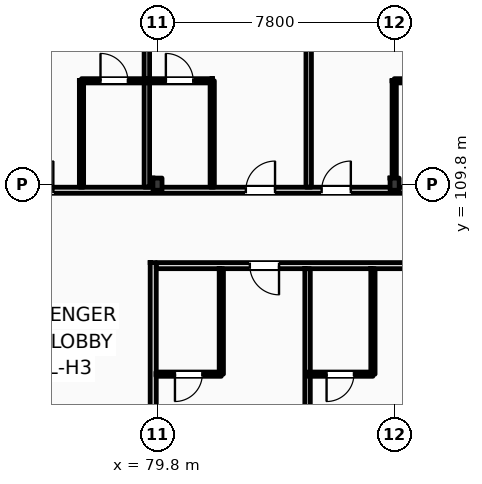
"""IFC4 building model, lengths in metres.
Left out: names, types, materials, properties, quantities, classifications, styles, units other than length and angle.
Written with IfcOpenShell. Run it as: python <this file> out.ifc"""

import sys

from ifc_helpers import new_model, si_unit, direction, frame, frame_2d, origin, origin_2d, place, context, subcontext, project, spatial, rectangle, i_section, extrude, element, fill, save


model = new_model("IFC4")
c1 = context("Model", 3, precision=1e-05, world=origin(), true_north=direction((0.0, 1.0)))
c2 = subcontext(c1, "Body", "Model", "MODEL_VIEW")
j1 = project(units=[si_unit("LENGTHUNIT", "METRE"), si_unit("PLANEANGLEUNIT", "RADIAN")], contexts=[c1])
p1 = place(None, origin())
s1 = spatial("IfcSite", under=j1, at=p1, CompositionType="ELEMENT")
p2 = place(p1, origin())
s2 = spatial("IfcBuilding", under=s1, at=p2, CompositionType="ELEMENT")
p3 = place(p2, frame((0.0, 0.0, 42.6)))
s3 = spatial("IfcBuildingStorey", under=s2, at=p3, CompositionType="ELEMENT", Elevation=42.6)
for number, where, z_axis, x_axis in (
    (1, (79.8, 109.8, 0.0), (0.0, 0.0, 1.0), (1.0, 0.0, 0.0)),
    (2, (87.6, 109.8, 0.0), (0.0, 0.0, 1.0), (1.0, 0.0, 0.0)),
):
    element("IfcColumn", number, at=place(p3, frame(where, z_axis=z_axis, x_axis=x_axis)), inside=s3, PredefinedType="COLUMN", context=c2, shape_type="SweptSolid", body=[
        extrude(i_section(OverallWidth=0.3, OverallDepth=0.4, WebThickness=0.013, FlangeThickness=0.024, FilletRadius=0.027, at=origin_2d()), origin(), (0.0, 0.0, 1.0), 4.2),
    ])
p4 = place(p3, frame((10.65, 109.6, 0.0), z_axis=(0.0, 0.0, 1.0), x_axis=(1.0, 0.0, 0.0)))
e3 = element("IfcWall", 3, at=p4, inside=s3, PredefinedType="PARTITIONING", context=c2, shape_type="SweptSolid", body=[
    extrude(rectangle(XDim=84.61, YDim=0.2, at=frame_2d((42.305, 0.0))), origin(), (0.0, 0.0, 1.0), 3.38),
])
p5 = place(p4, frame((15.926, 0.0, 0.0)))
e4 = element("IfcOpeningElement", 4, at=p5, cuts=e3, PredefinedType="OPENING", context=c2, shape_type="SweptSolid", body=[
    extrude(rectangle(XDim=1.02, YDim=2.2, at=frame_2d((0.51, 1.1))), frame((0.0, 0.11, 0.0), z_axis=(0.0, -1.0, 0.0), x_axis=(1.0, 0.0, 0.0)), (0.0, 0.0, 1.0), 0.22),
])
p6 = place(p4, frame((18.45, 0.0, 0.0)))
e5 = element("IfcOpeningElement", 5, at=p6, cuts=e3, PredefinedType="OPENING", context=c2, shape_type="SweptSolid", body=[
    extrude(rectangle(XDim=1.02, YDim=2.2, at=frame_2d((0.51, 1.1))), frame((0.0, 0.11, 0.0), z_axis=(0.0, -1.0, 0.0), x_axis=(1.0, 0.0, 0.0)), (0.0, 0.0, 1.0), 0.22),
])
p7 = place(p4, frame((25.742, 0.0, 0.0)))
e6 = element("IfcOpeningElement", 6, at=p7, cuts=e3, PredefinedType="OPENING", context=c2, shape_type="SweptSolid", body=[
    extrude(rectangle(XDim=1.02, YDim=2.2, at=frame_2d((0.51, 1.1))), frame((0.0, 0.11, 0.0), z_axis=(0.0, -1.0, 0.0), x_axis=(1.0, 0.0, 0.0)), (0.0, 0.0, 1.0), 0.22),
])
p8 = place(p4, frame((31.385, 0.0, 0.0)))
e7 = element("IfcOpeningElement", 7, at=p8, cuts=e3, PredefinedType="OPENING", context=c2, shape_type="SweptSolid", body=[
    extrude(rectangle(XDim=1.02, YDim=2.2, at=frame_2d((0.51, 1.1))), frame((0.0, 0.11, 0.0), z_axis=(0.0, -1.0, 0.0), x_axis=(1.0, 0.0, 0.0)), (0.0, 0.0, 1.0), 0.22),
])
p9 = place(p4, frame((33.908, 0.0, 0.0)))
e8 = element("IfcOpeningElement", 8, at=p9, cuts=e3, PredefinedType="OPENING", context=c2, shape_type="SweptSolid", body=[
    extrude(rectangle(XDim=0.96, YDim=2.2, at=frame_2d((0.48, 1.1))), frame((0.0, 0.11, 0.0), z_axis=(0.0, -1.0, 0.0), x_axis=(1.0, 0.0, 0.0)), (0.0, 0.0, 1.0), 0.22),
])
p10 = place(p4, frame((41.201, 0.0, 0.0)))
e9 = element("IfcOpeningElement", 9, at=p10, cuts=e3, PredefinedType="OPENING", context=c2, shape_type="SweptSolid", body=[
    extrude(rectangle(XDim=0.96, YDim=2.2, at=frame_2d((0.48, 1.1))), frame((0.0, 0.11, 0.0), z_axis=(0.0, -1.0, 0.0), x_axis=(1.0, 0.0, 0.0)), (0.0, 0.0, 1.0), 0.22),
])
p11 = place(p4, frame((46.844, 0.0, 0.0)))
e10 = element("IfcOpeningElement", 10, at=p11, cuts=e3, PredefinedType="OPENING", context=c2, shape_type="SweptSolid", body=[
    extrude(rectangle(XDim=0.96, YDim=2.2, at=frame_2d((0.48, 1.1))), frame((0.0, 0.11, 0.0), z_axis=(0.0, -1.0, 0.0), x_axis=(1.0, 0.0, 0.0)), (0.0, 0.0, 1.0), 0.22),
])
p12 = place(p4, frame((49.337, 0.0, 0.0)))
e11 = element("IfcOpeningElement", 11, at=p12, cuts=e3, PredefinedType="OPENING", context=c2, shape_type="SweptSolid", body=[
    extrude(rectangle(XDim=0.96, YDim=2.2, at=frame_2d((0.48, 1.1))), frame((0.0, 0.11, 0.0), z_axis=(0.0, -1.0, 0.0), x_axis=(1.0, 0.0, 0.0)), (0.0, 0.0, 1.0), 0.22),
])
p13 = place(p4, frame((56.63, 0.0, 0.0)))
e12 = element("IfcOpeningElement", 12, at=p13, cuts=e3, PredefinedType="OPENING", context=c2, shape_type="SweptSolid", body=[
    extrude(rectangle(XDim=0.96, YDim=2.2, at=frame_2d((0.48, 1.1))), frame((0.0, 0.11, 0.0), z_axis=(0.0, -1.0, 0.0), x_axis=(1.0, 0.0, 0.0)), (0.0, 0.0, 1.0), 0.22),
])
p14 = place(p4, frame((62.523, 0.0, 0.0)))
e13 = element("IfcOpeningElement", 13, at=p14, cuts=e3, PredefinedType="OPENING", context=c2, shape_type="SweptSolid", body=[
    extrude(rectangle(XDim=0.96, YDim=2.2, at=frame_2d((0.48, 1.1))), frame((0.0, 0.11, 0.0), z_axis=(0.0, -1.0, 0.0), x_axis=(1.0, 0.0, 0.0)), (0.0, 0.0, 1.0), 0.22),
])
p15 = place(p4, frame((64.765, 0.0, 0.0)))
e14 = element("IfcOpeningElement", 14, at=p15, cuts=e3, PredefinedType="OPENING", context=c2, shape_type="SweptSolid", body=[
    extrude(rectangle(XDim=0.96, YDim=2.2, at=frame_2d((0.48, 1.1))), frame((0.0, 0.11, 0.0), z_axis=(0.0, -1.0, 0.0), x_axis=(1.0, 0.0, 0.0)), (0.0, 0.0, 1.0), 0.22),
])
p16 = place(p4, frame((72.057, 0.0, 0.0)))
e15 = element("IfcOpeningElement", 15, at=p16, cuts=e3, PredefinedType="OPENING", context=c2, shape_type="SweptSolid", body=[
    extrude(rectangle(XDim=0.96, YDim=2.2, at=frame_2d((0.48, 1.1))), frame((0.0, 0.11, 0.0), z_axis=(0.0, -1.0, 0.0), x_axis=(1.0, 0.0, 0.0)), (0.0, 0.0, 1.0), 0.22),
])
p17 = place(p4, frame((74.55, 0.0, 0.0)))
e16 = element("IfcOpeningElement", 16, at=p17, cuts=e3, PredefinedType="OPENING", context=c2, shape_type="SweptSolid", body=[
    extrude(rectangle(XDim=0.96, YDim=2.2, at=frame_2d((0.48, 1.1))), frame((0.0, 0.11, 0.0), z_axis=(0.0, -1.0, 0.0), x_axis=(1.0, 0.0, 0.0)), (0.0, 0.0, 1.0), 0.22),
])
p18 = place(p4, frame((80.163, 0.0, 0.0)))
e17 = element("IfcOpeningElement", 17, at=p18, cuts=e3, PredefinedType="OPENING", context=c2, shape_type="SweptSolid", body=[
    extrude(rectangle(XDim=0.96, YDim=2.2, at=frame_2d((0.48, 1.1))), frame((0.0, 0.11, 0.0), z_axis=(0.0, -1.0, 0.0), x_axis=(1.0, 0.0, 0.0)), (0.0, 0.0, 1.0), 0.22),
])
p19 = place(p4, frame((2.716, 0.0, 0.0)))
e18 = element("IfcOpeningElement", 18, at=p19, cuts=e3, PredefinedType="OPENING", context=c2, shape_type="SweptSolid", body=[
    extrude(rectangle(XDim=1.35, YDim=2.25, at=frame_2d((0.675, 1.125))), frame((0.0, 0.11, 0.0), z_axis=(0.0, -1.0, 0.0), x_axis=(1.0, 0.0, 0.0)), (0.0, 0.0, 1.0), 0.22),
])
p20 = place(p4, frame((6.65, 0.0, 0.0)))
e19 = element("IfcOpeningElement", 19, at=p20, cuts=e3, PredefinedType="OPENING", context=c2, shape_type="SweptSolid", body=[
    extrude(rectangle(XDim=1.35, YDim=2.25, at=frame_2d((0.675, 1.125))), frame((0.0, 0.11, 0.0), z_axis=(0.0, -1.0, 0.0), x_axis=(1.0, 0.0, 0.0)), (0.0, 0.0, 1.0), 0.22),
])
p21 = place(p4, frame((10.583, 0.0, 0.0)))
e20 = element("IfcOpeningElement", 20, at=p21, cuts=e3, PredefinedType="OPENING", context=c2, shape_type="SweptSolid", body=[
    extrude(rectangle(XDim=1.35, YDim=2.25, at=frame_2d((0.675, 1.125))), frame((0.0, 0.11, 0.0), z_axis=(0.0, -1.0, 0.0), x_axis=(1.0, 0.0, 0.0)), (0.0, 0.0, 1.0), 0.22),
])
p22 = place(p3, frame((79.76, 107.12, 0.0), z_axis=(0.0, 0.0, 1.0), x_axis=(1.0, 0.0, 0.0)))
e21 = element("IfcWall", 21, at=p22, inside=s3, PredefinedType="PARTITIONING", context=c2, shape_type="SweptSolid", body=[
    extrude(rectangle(XDim=15.5, YDim=0.2, at=frame_2d((7.75, 0.0))), origin(), (0.0, 0.0, 1.0), 3.94),
])
p23 = place(p22, frame((3.078, 0.0, 0.0)))
e22 = element("IfcOpeningElement", 22, at=p23, cuts=e21, PredefinedType="OPENING", context=c2, shape_type="SweptSolid", body=[
    extrude(rectangle(XDim=0.96, YDim=2.2, at=frame_2d((0.48, 1.1))), frame((0.0, 0.11, 0.0), z_axis=(0.0, -1.0, 0.0), x_axis=(1.0, 0.0, 0.0)), (0.0, 0.0, 1.0), 0.22),
])
p24 = place(p22, frame((8.186, 0.0, 0.0)))
e23 = element("IfcOpeningElement", 23, at=p24, cuts=e21, PredefinedType="OPENING", context=c2, shape_type="SweptSolid", body=[
    extrude(rectangle(XDim=0.96, YDim=2.2, at=frame_2d((0.48, 1.1))), frame((0.0, 0.11, 0.0), z_axis=(0.0, -1.0, 0.0), x_axis=(1.0, 0.0, 0.0)), (0.0, 0.0, 1.0), 0.22),
])
p25 = place(p22, frame((11.167, 0.0, 0.0)))
e24 = element("IfcOpeningElement", 24, at=p25, cuts=e21, PredefinedType="OPENING", context=c2, shape_type="SweptSolid", body=[
    extrude(rectangle(XDim=0.96, YDim=2.2, at=frame_2d((0.48, 1.1))), frame((0.0, 0.11, 0.0), z_axis=(0.0, -1.0, 0.0), x_axis=(1.0, 0.0, 0.0)), (0.0, 0.0, 1.0), 0.22),
])
p26 = place(p3, frame((79.66, 96.14, 0.0), z_axis=(0.0, 0.0, 1.0), x_axis=(0.0, 1.0, 0.0)))
e25 = element("IfcWall", 25, at=p26, inside=s3, PredefinedType="PARTITIONING", context=c2, shape_type="SweptSolid", body=[
    extrude(rectangle(XDim=11.08, YDim=0.2, at=frame_2d((5.54, 0.0))), origin(), (0.0, 0.0, 1.0), 3.51),
])
p27 = place(p3, frame((79.451, 109.7, 0.0), z_axis=(0.0, 0.0, 1.0), x_axis=(0.0, 1.0, 0.0)))
e26 = element("IfcWall", 26, at=p27, inside=s3, PredefinedType="PARTITIONING", context=c2, shape_type="SweptSolid", body=[
    extrude(rectangle(XDim=8.15, YDim=0.18, at=frame_2d((4.075, 0.0))), origin(), (0.0, 0.0, 1.0), 3.94),
])
p28 = place(p3, frame((77.301, 109.7, 0.0), z_axis=(0.0, 0.0, 1.0), x_axis=(0.0, 1.0, 0.0)))
e27 = element("IfcWall", 27, at=p28, inside=s3, PredefinedType="PARTITIONING", context=c2, shape_type="SweptSolid", body=[
    extrude(rectangle(XDim=3.5, YDim=0.14, at=frame_2d((1.75, 0.0))), origin(), (0.0, 0.0, 1.0), 3.63),
])
p29 = place(p3, frame((77.301, 113.2, 0.0), z_axis=(0.0, 0.0, 1.0), x_axis=(1.0, 0.0, 0.0)))
e28 = element("IfcWall", 28, at=p29, inside=s3, PredefinedType="PARTITIONING", context=c2, shape_type="SweptSolid", body=[
    extrude(rectangle(XDim=2.15, YDim=0.14, at=frame_2d((1.075, 0.0))), origin(), (0.0, 0.0, 1.0), 3.94),
])
p30 = place(p29, frame((0.625, 0.0, 0.0)))
e29 = element("IfcOpeningElement", 29, at=p30, cuts=e28, PredefinedType="OPENING", context=c2, shape_type="SweptSolid", body=[
    extrude(rectangle(XDim=0.9, YDim=2.1, at=frame_2d((0.45, 1.05))), frame((0.0, 0.08, 0.0), z_axis=(0.0, -1.0, 0.0), x_axis=(1.0, 0.0, 0.0)), (0.0, 0.0, 1.0), 0.16),
])
p31 = place(p3, frame((84.774, 109.7, 0.0), z_axis=(0.0, 0.0, 1.0), x_axis=(0.0, 1.0, 0.0)))
e30 = element("IfcWall", 30, at=p31, inside=s3, PredefinedType="PARTITIONING", context=c2, shape_type="SweptSolid", body=[
    extrude(rectangle(XDim=8.15, YDim=0.18, at=frame_2d((4.075, 0.0))), origin(), (0.0, 0.0, 1.0), 3.57),
])
p32 = place(p3, frame((81.601, 109.7, 0.0), z_axis=(0.0, 0.0, 1.0), x_axis=(0.0, 1.0, 0.0)))
e31 = element("IfcWall", 31, at=p32, inside=s3, PredefinedType="PARTITIONING", context=c2, shape_type="SweptSolid", body=[
    extrude(rectangle(XDim=3.5, YDim=0.14, at=frame_2d((1.75, 0.0))), origin(), (0.0, 0.0, 1.0), 3.94),
])
p33 = place(p3, frame((79.451, 113.2, 0.0), z_axis=(0.0, 0.0, 1.0), x_axis=(1.0, 0.0, 0.0)))
e32 = element("IfcWall", 32, at=p33, inside=s3, PredefinedType="PARTITIONING", context=c2, shape_type="SweptSolid", body=[
    extrude(rectangle(XDim=2.15, YDim=0.14, at=frame_2d((1.075, 0.0))), origin(), (0.0, 0.0, 1.0), 3.94),
])
p34 = place(p33, frame((0.625, 0.0, 0.0)))
e33 = element("IfcOpeningElement", 33, at=p34, cuts=e32, PredefinedType="OPENING", context=c2, shape_type="SweptSolid", body=[
    extrude(rectangle(XDim=0.9, YDim=2.1, at=frame_2d((0.45, 1.05))), frame((0.0, 0.08, 0.0), z_axis=(0.0, -1.0, 0.0), x_axis=(1.0, 0.0, 0.0)), (0.0, 0.0, 1.0), 0.16),
])
p35 = place(p3, frame((87.587, 109.7, 0.0), z_axis=(0.0, 0.0, 1.0), x_axis=(0.0, 1.0, 0.0)))
e34 = element("IfcWall", 34, at=p35, inside=s3, PredefinedType="PARTITIONING", context=c2, shape_type="SweptSolid", body=[
    extrude(rectangle(XDim=3.5, YDim=0.14, at=frame_2d((1.75, 0.0))), origin(), (0.0, 0.0, 1.0), 3.51),
])
p36 = place(p3, frame((87.587, 113.2, 0.0), z_axis=(0.0, 0.0, 1.0), x_axis=(1.0, 0.0, 0.0)))
e35 = element("IfcWall", 35, at=p36, inside=s3, PredefinedType="PARTITIONING", context=c2, shape_type="SweptSolid", body=[
    extrude(rectangle(XDim=2.15, YDim=0.14, at=frame_2d((1.075, 0.0))), origin(), (0.0, 0.0, 1.0), 3.94),
])
p37 = place(p36, frame((0.625, 0.0, 0.0)))
e36 = element("IfcOpeningElement", 36, at=p37, cuts=e35, PredefinedType="OPENING", context=c2, shape_type="SweptSolid", body=[
    extrude(rectangle(XDim=0.9, YDim=2.1, at=frame_2d((0.45, 1.05))), frame((0.0, 0.08, 0.0), z_axis=(0.0, -1.0, 0.0), x_axis=(1.0, 0.0, 0.0)), (0.0, 0.0, 1.0), 0.16),
])
p38 = place(p3, frame((84.737, 96.14, 0.0), z_axis=(0.0, 0.0, 1.0), x_axis=(0.0, 1.0, 0.0)))
e37 = element("IfcWall", 37, at=p38, inside=s3, PredefinedType="PARTITIONING", context=c2, shape_type="SweptSolid", body=[
    extrude(rectangle(XDim=10.88, YDim=0.18, at=frame_2d((5.44, 0.0))), origin(), (0.0, 0.0, 1.0), 3.94),
])
p39 = place(p3, frame((81.9, 103.55, 0.0), z_axis=(0.0, 0.0, 1.0), x_axis=(0.0, 1.0, 0.0)))
e38 = element("IfcWall", 38, at=p39, inside=s3, PredefinedType="PARTITIONING", context=c2, shape_type="SweptSolid", body=[
    extrude(rectangle(XDim=3.47, YDim=0.14, at=frame_2d((1.735, 0.0))), origin(), (0.0, 0.0, 1.0), 3.94),
])
p40 = place(p3, frame((79.75, 103.55, 0.0), z_axis=(0.0, 0.0, 1.0), x_axis=(1.0, 0.0, 0.0)))
e39 = element("IfcWall", 39, at=p40, inside=s3, PredefinedType="PARTITIONING", context=c2, shape_type="SweptSolid", body=[
    extrude(rectangle(XDim=2.15, YDim=0.14, at=frame_2d((1.075, 0.0))), origin(), (0.0, 0.0, 1.0), 3.94),
])
p41 = place(p40, frame((0.625, 0.0, 0.0)))
e40 = element("IfcOpeningElement", 40, at=p41, cuts=e39, PredefinedType="OPENING", context=c2, shape_type="SweptSolid", body=[
    extrude(rectangle(XDim=0.9, YDim=2.1, at=frame_2d((0.45, 1.05))), frame((0.0, 0.08, 0.0), z_axis=(0.0, -1.0, 0.0), x_axis=(1.0, 0.0, 0.0)), (0.0, 0.0, 1.0), 0.16),
])
p42 = place(p3, frame((86.887, 103.55, 0.0), z_axis=(0.0, 0.0, 1.0), x_axis=(0.0, 1.0, 0.0)))
e41 = element("IfcWall", 41, at=p42, inside=s3, PredefinedType="PARTITIONING", context=c2, shape_type="SweptSolid", body=[
    extrude(rectangle(XDim=3.47, YDim=0.14, at=frame_2d((1.735, 0.0))), origin(), (0.0, 0.0, 1.0), 3.94),
])
p43 = place(p3, frame((84.737, 103.55, 0.0), z_axis=(0.0, 0.0, 1.0), x_axis=(1.0, 0.0, 0.0)))
e42 = element("IfcWall", 42, at=p43, inside=s3, PredefinedType="PARTITIONING", context=c2, shape_type="SweptSolid", body=[
    extrude(rectangle(XDim=2.15, YDim=0.14, at=frame_2d((1.075, 0.0))), origin(), (0.0, 0.0, 1.0), 3.94),
])
p44 = place(p43, frame((0.625, 0.0, 0.0)))
e43 = element("IfcOpeningElement", 43, at=p44, cuts=e42, PredefinedType="OPENING", context=c2, shape_type="SweptSolid", body=[
    extrude(rectangle(XDim=0.9, YDim=2.1, at=frame_2d((0.45, 1.05))), frame((0.0, 0.08, 0.0), z_axis=(0.0, -1.0, 0.0), x_axis=(1.0, 0.0, 0.0)), (0.0, 0.0, 1.0), 0.16),
])
p45 = place(p15, origin())
e44 = element("IfcDoor", 44, at=p45, inside=s3, OperationType="SINGLE_SWING_RIGHT", PredefinedType="DOOR", context=c2, shape_type="SweptSolid", body=[
    extrude(rectangle(XDim=0.96, YDim=2.2, at=frame_2d((0.48, 1.1))), frame((0.0, 0.025, 0.0), z_axis=(0.0, -1.0, 0.0), x_axis=(1.0, 0.0, 0.0)), (0.0, 0.0, 1.0), 0.05),
])
fill(e14, e44)
p46 = place(p30, origin())
e45 = element("IfcDoor", 45, at=p46, inside=s3, OperationType="SINGLE_SWING_LEFT", PredefinedType="DOOR", context=c2, shape_type="SweptSolid", body=[
    extrude(rectangle(XDim=0.9, YDim=2.1, at=frame_2d((0.45, 1.05))), frame((0.0, 0.025, 0.0), z_axis=(0.0, -1.0, 0.0), x_axis=(1.0, 0.0, 0.0)), (0.0, 0.0, 1.0), 0.05),
])
fill(e29, e45)
p47 = place(p16, origin())
e46 = element("IfcDoor", 46, at=p47, inside=s3, OperationType="SINGLE_SWING_RIGHT", PredefinedType="DOOR", context=c2, shape_type="SweptSolid", body=[
    extrude(rectangle(XDim=0.96, YDim=2.2, at=frame_2d((0.48, 1.1))), frame((0.0, 0.025, 0.0), z_axis=(0.0, -1.0, 0.0), x_axis=(1.0, 0.0, 0.0)), (0.0, 0.0, 1.0), 0.05),
])
fill(e15, e46)
p48 = place(p34, origin())
e47 = element("IfcDoor", 47, at=p48, inside=s3, OperationType="SINGLE_SWING_LEFT", PredefinedType="DOOR", context=c2, shape_type="SweptSolid", body=[
    extrude(rectangle(XDim=0.9, YDim=2.1, at=frame_2d((0.45, 1.05))), frame((0.0, 0.025, 0.0), z_axis=(0.0, -1.0, 0.0), x_axis=(1.0, 0.0, 0.0)), (0.0, 0.0, 1.0), 0.05),
])
fill(e33, e47)
p49 = place(p17, origin())
e48 = element("IfcDoor", 48, at=p49, inside=s3, OperationType="SINGLE_SWING_RIGHT", PredefinedType="DOOR", context=c2, shape_type="SweptSolid", body=[
    extrude(rectangle(XDim=0.96, YDim=2.2, at=frame_2d((0.48, 1.1))), frame((0.0, 0.025, 0.0), z_axis=(0.0, -1.0, 0.0), x_axis=(1.0, 0.0, 0.0)), (0.0, 0.0, 1.0), 0.05),
])
fill(e16, e48)
p50 = place(p23, frame((0.96, 0.0, 0.0), z_axis=(0.0, 0.0, 1.0), x_axis=(-1.0, 0.0, 0.0)))
e49 = element("IfcDoor", 49, at=p50, inside=s3, OperationType="SINGLE_SWING_RIGHT", PredefinedType="DOOR", context=c2, shape_type="SweptSolid", body=[
    extrude(rectangle(XDim=0.96, YDim=2.2, at=frame_2d((0.48, 1.1))), frame((0.0, 0.025, 0.0), z_axis=(0.0, -1.0, 0.0), x_axis=(1.0, 0.0, 0.0)), (0.0, 0.0, 1.0), 0.05),
])
fill(e22, e49)
p51 = place(p41, frame((0.9, 0.0, 0.0), z_axis=(0.0, 0.0, 1.0), x_axis=(-1.0, 0.0, 0.0)))
e50 = element("IfcDoor", 50, at=p51, inside=s3, OperationType="SINGLE_SWING_LEFT", PredefinedType="DOOR", context=c2, shape_type="SweptSolid", body=[
    extrude(rectangle(XDim=0.9, YDim=2.1, at=frame_2d((0.45, 1.05))), frame((0.0, 0.025, 0.0), z_axis=(0.0, -1.0, 0.0), x_axis=(1.0, 0.0, 0.0)), (0.0, 0.0, 1.0), 0.05),
])
fill(e40, e50)
p52 = place(p44, frame((0.9, 0.0, 0.0), z_axis=(0.0, 0.0, 1.0), x_axis=(-1.0, 0.0, 0.0)))
e51 = element("IfcDoor", 51, at=p52, inside=s3, OperationType="SINGLE_SWING_LEFT", PredefinedType="DOOR", context=c2, shape_type="SweptSolid", body=[
    extrude(rectangle(XDim=0.9, YDim=2.1, at=frame_2d((0.45, 1.05))), frame((0.0, 0.025, 0.0), z_axis=(0.0, -1.0, 0.0), x_axis=(1.0, 0.0, 0.0)), (0.0, 0.0, 1.0), 0.05),
])
fill(e43, e51)
save(model, sys.argv[1])
